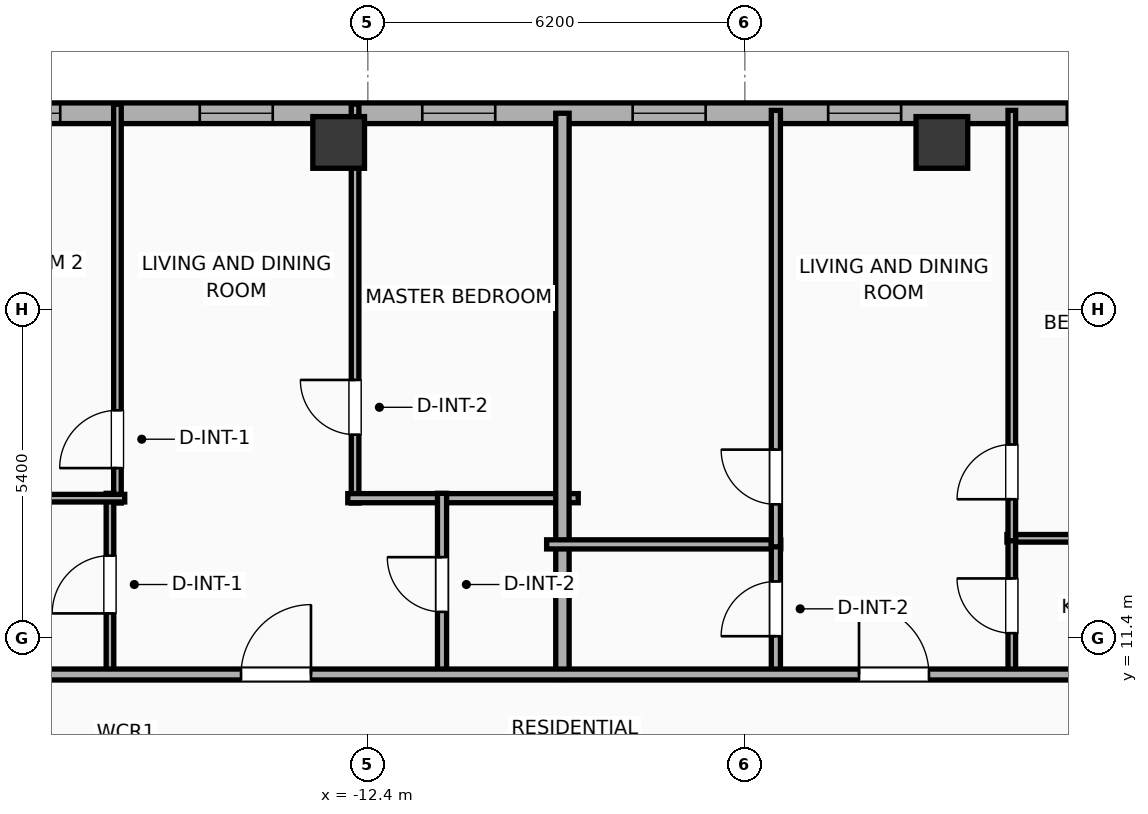
"""IFC4 building model, lengths in metres.
Left out: names, types, materials, properties, quantities, classifications, styles, units other than length and angle.
Written with IfcOpenShell. Run it as: python <this file> out.ifc"""

import sys

from ifc_helpers import new_model, si_unit, direction, frame, frame_2d, origin, origin_2d, place, context, subcontext, project, spatial, rectangle, hollow_rectangle, extrude, element, fill, save


model = new_model("IFC4")
c1 = context("Model", 3, precision=1e-05, world=origin(), true_north=direction((0.0, 1.0)))
c2 = subcontext(c1, "Body", "Model", "MODEL_VIEW")
j1 = project(units=[si_unit("LENGTHUNIT", "METRE"), si_unit("PLANEANGLEUNIT", "RADIAN")], contexts=[c1])
p1 = place(None, origin())
s1 = spatial("IfcSite", under=j1, at=p1, CompositionType="ELEMENT")
p2 = place(p1, origin())
s2 = spatial("IfcBuilding", under=s1, at=p2, CompositionType="ELEMENT")
p3 = place(p2, frame((0.0, 0.0, 215.8)))
s3 = spatial("IfcBuildingStorey", under=s2, at=p3, CompositionType="ELEMENT", Elevation=215.8)
for number, where, z_axis, x_axis in (
    (1, (-2.96, 19.55, 0.0), (0.0, 0.0, 1.0), (1.0, 0.0, 0.0)),
    (2, (-12.88, 19.55, 0.0), (0.0, 0.0, 1.0), (1.0, 0.0, 0.0)),
):
    element("IfcColumn", number, at=place(p3, frame(where, z_axis=z_axis, x_axis=x_axis)), inside=s3, PredefinedType="COLUMN", context=c2, shape_type="SweptSolid", body=[
        extrude(hollow_rectangle(XDim=0.85, YDim=0.85, WallThickness=0.028, at=origin_2d()), origin(), (0.0, 0.0, 1.0), 3.9),
    ])
p4 = place(p3, frame((-22.783, 20.03, 0.0), z_axis=(0.0, 0.0, 1.0), x_axis=(1.0, 0.0, 0.0)))
e3 = element("IfcWall", 3, at=p4, inside=s3, PredefinedType="ELEMENTEDWALL", context=c2, shape_type="SweptSolid", body=[
    extrude(rectangle(XDim=49.566, YDim=0.34, at=frame_2d((24.783, 0.0))), origin(), (0.0, 0.0, 1.0), 3.65),
])
p5 = place(p4, frame((40.956, 0.0, 0.75)))
e4 = element("IfcOpeningElement", 4, at=p5, cuts=e3, PredefinedType="OPENING", context=c2, shape_type="SweptSolid", body=[
    extrude(rectangle(XDim=2.4, YDim=2.1, at=frame_2d((1.2, 1.05))), frame((0.0, 0.18, 0.0), z_axis=(0.0, -1.0, 0.0), x_axis=(1.0, 0.0, 0.0)), (0.0, 0.0, 1.0), 0.36),
])
p6 = place(p4, frame((1.437, 0.0, 0.75)))
e5 = element("IfcOpeningElement", 5, at=p6, cuts=e3, PredefinedType="OPENING", context=c2, shape_type="SweptSolid", body=[
    extrude(rectangle(XDim=1.2, YDim=2.05, at=frame_2d((0.6, 1.025))), frame((0.0, 0.18, 0.0), z_axis=(0.0, -1.0, 0.0), x_axis=(1.0, 0.0, 0.0)), (0.0, 0.0, 1.0), 0.36),
])
p7 = place(p4, frame((7.619, 0.0, 0.75)))
e6 = element("IfcOpeningElement", 6, at=p7, cuts=e3, PredefinedType="OPENING", context=c2, shape_type="SweptSolid", body=[
    extrude(rectangle(XDim=1.2, YDim=2.05, at=frame_2d((0.6, 1.025))), frame((0.0, 0.18, 0.0), z_axis=(0.0, -1.0, 0.0), x_axis=(1.0, 0.0, 0.0)), (0.0, 0.0, 1.0), 0.36),
])
p8 = place(p4, frame((4.124, 0.0, 0.75)))
e7 = element("IfcOpeningElement", 7, at=p8, cuts=e3, PredefinedType="OPENING", context=c2, shape_type="SweptSolid", body=[
    extrude(rectangle(XDim=1.2, YDim=2.05, at=frame_2d((0.6, 1.025))), frame((0.0, 0.18, 0.0), z_axis=(0.0, -1.0, 0.0), x_axis=(1.0, 0.0, 0.0)), (0.0, 0.0, 1.0), 0.36),
])
p9 = place(p4, frame((11.278, 0.0, 0.75)))
e8 = element("IfcOpeningElement", 8, at=p9, cuts=e3, PredefinedType="OPENING", context=c2, shape_type="SweptSolid", body=[
    extrude(rectangle(XDim=1.2, YDim=2.05, at=frame_2d((0.6, 1.025))), frame((0.0, 0.18, 0.0), z_axis=(0.0, -1.0, 0.0), x_axis=(1.0, 0.0, 0.0)), (0.0, 0.0, 1.0), 0.36),
])
p10 = place(p4, frame((17.953, 0.0, 0.75)))
e9 = element("IfcOpeningElement", 9, at=p10, cuts=e3, PredefinedType="OPENING", context=c2, shape_type="SweptSolid", body=[
    extrude(rectangle(XDim=1.2, YDim=2.05, at=frame_2d((0.6, 1.025))), frame((0.0, 0.18, 0.0), z_axis=(0.0, -1.0, 0.0), x_axis=(1.0, 0.0, 0.0)), (0.0, 0.0, 1.0), 0.36),
])
p11 = place(p4, frame((14.738, 0.0, 0.75)))
e10 = element("IfcOpeningElement", 10, at=p11, cuts=e3, PredefinedType="OPENING", context=c2, shape_type="SweptSolid", body=[
    extrude(rectangle(XDim=1.2, YDim=2.05, at=frame_2d((0.6, 1.025))), frame((0.0, 0.18, 0.0), z_axis=(0.0, -1.0, 0.0), x_axis=(1.0, 0.0, 0.0)), (0.0, 0.0, 1.0), 0.36),
])
p12 = place(p4, frame((21.878, 0.0, 0.75)))
e11 = element("IfcOpeningElement", 11, at=p12, cuts=e3, PredefinedType="OPENING", context=c2, shape_type="SweptSolid", body=[
    extrude(rectangle(XDim=1.2, YDim=2.05, at=frame_2d((0.6, 1.025))), frame((0.0, 0.18, 0.0), z_axis=(0.0, -1.0, 0.0), x_axis=(1.0, 0.0, 0.0)), (0.0, 0.0, 1.0), 0.36),
])
p13 = place(p4, frame((27.878, 0.0, 0.75)))
e12 = element("IfcOpeningElement", 12, at=p13, cuts=e3, PredefinedType="OPENING", context=c2, shape_type="SweptSolid", body=[
    extrude(rectangle(XDim=1.2, YDim=2.05, at=frame_2d((0.6, 1.025))), frame((0.0, 0.18, 0.0), z_axis=(0.0, -1.0, 0.0), x_axis=(1.0, 0.0, 0.0)), (0.0, 0.0, 1.0), 0.36),
])
p14 = place(p4, frame((24.863, 0.0, 0.75)))
e13 = element("IfcOpeningElement", 13, at=p14, cuts=e3, PredefinedType="OPENING", context=c2, shape_type="SweptSolid", body=[
    extrude(rectangle(XDim=1.2, YDim=2.05, at=frame_2d((0.6, 1.025))), frame((0.0, 0.18, 0.0), z_axis=(0.0, -1.0, 0.0), x_axis=(1.0, 0.0, 0.0)), (0.0, 0.0, 1.0), 0.36),
])
p15 = place(p4, frame((32.078, 0.0, 0.75)))
e14 = element("IfcOpeningElement", 14, at=p15, cuts=e3, PredefinedType="OPENING", context=c2, shape_type="SweptSolid", body=[
    extrude(rectangle(XDim=1.2, YDim=2.05, at=frame_2d((0.6, 1.025))), frame((0.0, 0.18, 0.0), z_axis=(0.0, -1.0, 0.0), x_axis=(1.0, 0.0, 0.0)), (0.0, 0.0, 1.0), 0.36),
])
p16 = place(p4, frame((35.216, 0.0, 0.75)))
e15 = element("IfcOpeningElement", 15, at=p16, cuts=e3, PredefinedType="OPENING", context=c2, shape_type="SweptSolid", body=[
    extrude(rectangle(XDim=1.2, YDim=2.05, at=frame_2d((0.6, 1.025))), frame((0.0, 0.18, 0.0), z_axis=(0.0, -1.0, 0.0), x_axis=(1.0, 0.0, 0.0)), (0.0, 0.0, 1.0), 0.36),
])
p17 = place(p4, frame((45.73, 0.0, 0.75)))
e16 = element("IfcOpeningElement", 16, at=p17, cuts=e3, PredefinedType="OPENING", context=c2, shape_type="SweptSolid", body=[
    extrude(rectangle(XDim=1.2, YDim=2.05, at=frame_2d((0.6, 1.025))), frame((0.0, 0.18, 0.0), z_axis=(0.0, -1.0, 0.0), x_axis=(1.0, 0.0, 0.0)), (0.0, 0.0, 1.0), 0.36),
])
p18 = place(p3, frame((-16.518, 13.62, 0.0), z_axis=(0.0, 0.0, 1.0), x_axis=(0.0, 1.0, 0.0)))
e17 = element("IfcWall", 17, at=p18, inside=s3, PredefinedType="PARTITIONING", context=c2, shape_type="SweptSolid", body=[
    extrude(rectangle(XDim=6.56, YDim=0.125, at=frame_2d((3.28, 0.0))), origin(), (0.0, 0.0, 1.0), 3.65),
])
p19 = place(p18, frame((0.575, 0.0, 0.0)))
e18 = element("IfcOpeningElement", 18, at=p19, cuts=e17, PredefinedType="OPENING", context=c2, shape_type="SweptSolid", body=[
    extrude(rectangle(XDim=0.95, YDim=2.05, at=frame_2d((0.475, 1.025))), frame((0.0, 0.073, 0.0), z_axis=(0.0, -1.0, 0.0), x_axis=(1.0, 0.0, 0.0)), (0.0, 0.0, 1.0), 0.145),
])
p20 = place(p3, frame((-12.61, 13.62, 0.0), z_axis=(0.0, 0.0, 1.0), x_axis=(0.0, 1.0, 0.0)))
e19 = element("IfcWall", 19, at=p20, inside=s3, PredefinedType="PARTITIONING", context=c2, shape_type="SweptSolid", body=[
    extrude(rectangle(XDim=6.56, YDim=0.125, at=frame_2d((3.28, 0.0))), origin(), (0.0, 0.0, 1.0), 3.09),
])
p21 = place(p20, frame((1.125, 0.0, 0.0)))
e20 = element("IfcOpeningElement", 20, at=p21, cuts=e19, PredefinedType="OPENING", context=c2, shape_type="SweptSolid", body=[
    extrude(rectangle(XDim=0.9, YDim=2.05, at=frame_2d((0.45, 1.025))), frame((0.0, 0.073, 0.0), z_axis=(0.0, -1.0, 0.0), x_axis=(1.0, 0.0, 0.0)), (0.0, 0.0, 1.0), 0.145),
])
p22 = place(p3, frame((-12.73, 13.7, 0.0), z_axis=(0.0, 0.0, 1.0), x_axis=(1.0, 0.0, 0.0)))
e21 = element("IfcWall", 21, at=p22, inside=s3, PredefinedType="PLUMBINGWALL", context=c2, shape_type="SweptSolid", body=[
    extrude(rectangle(XDim=3.79, YDim=0.15, at=frame_2d((1.895, 0.0))), origin(), (0.0, 0.0, 1.0), 3.65),
])
p23 = place(p3, frame((-16.641, 10.78, 0.0), z_axis=(0.0, 0.0, 1.0), x_axis=(0.0, 1.0, 0.0)))
e22 = element("IfcWall", 22, at=p23, inside=s3, PredefinedType="PARTITIONING", context=c2, shape_type="SweptSolid", body=[
    extrude(rectangle(XDim=3.0, YDim=0.125, at=frame_2d((1.5, 0.0))), origin(), (0.0, 0.0, 1.0), 3.65),
])
p24 = place(p23, frame((1.025, 0.0, 0.0)))
e23 = element("IfcOpeningElement", 23, at=p24, cuts=e22, PredefinedType="OPENING", context=c2, shape_type="SweptSolid", body=[
    extrude(rectangle(XDim=0.95, YDim=2.05, at=frame_2d((0.475, 1.025))), frame((0.0, 0.073, 0.0), z_axis=(0.0, -1.0, 0.0), x_axis=(1.0, 0.0, 0.0)), (0.0, 0.0, 1.0), 0.145),
])
p25 = place(p3, frame((-19.86, 13.7, 0.0), z_axis=(0.0, 0.0, 1.0), x_axis=(1.0, 0.0, 0.0)))
e24 = element("IfcWall", 24, at=p25, inside=s3, PredefinedType="PARTITIONING", context=c2, shape_type="SweptSolid", body=[
    extrude(rectangle(XDim=3.462, YDim=0.125, at=frame_2d((1.731, 0.0))), origin(), (0.0, 0.0, 1.0), 3.65),
])
p26 = place(p3, frame((-11.18, 10.78, 0.0), z_axis=(0.0, 0.0, 1.0), x_axis=(0.0, 1.0, 0.0)))
e25 = element("IfcWall", 25, at=p26, inside=s3, PredefinedType="PLUMBINGWALL", context=c2, shape_type="SweptSolid", body=[
    extrude(rectangle(XDim=3.0, YDim=0.15, at=frame_2d((1.5, 0.0))), origin(), (0.0, 0.0, 1.0), 3.65),
])
p27 = place(p26, frame((1.05, 0.0, 0.0)))
e26 = element("IfcOpeningElement", 26, at=p27, cuts=e25, PredefinedType="OPENING", context=c2, shape_type="SweptSolid", body=[
    extrude(rectangle(XDim=0.9, YDim=2.05, at=frame_2d((0.45, 1.025))), frame((0.0, 0.085, 0.0), z_axis=(0.0, -1.0, 0.0), x_axis=(1.0, 0.0, 0.0)), (0.0, 0.0, 1.0), 0.17),
])
p28 = place(p3, frame((-9.2, 10.72, 0.0), z_axis=(0.0, 0.0, 1.0), x_axis=(0.0, 1.0, 0.0)))
e27 = element("IfcWall", 27, at=p28, inside=s3, PredefinedType="PARTITIONING", context=c2, shape_type="SweptSolid", body=[
    extrude(rectangle(XDim=9.31, YDim=0.22, at=frame_2d((4.655, 0.0))), origin(), (0.0, 0.0, 1.0), 3.65),
])
p29 = place(p3, frame((-9.46, 12.94, 0.0), z_axis=(0.0, 0.0, 1.0), x_axis=(1.0, 0.0, 0.0)))
e28 = element("IfcWall", 28, at=p29, inside=s3, PredefinedType="PLUMBINGWALL", context=c2, shape_type="SweptSolid", body=[
    extrude(rectangle(XDim=3.85, YDim=0.15, at=frame_2d((1.925, 0.0))), origin(), (0.0, 0.0, 1.0), 3.65),
])
p30 = place(p3, frame((-1.89, 13.04, 0.0), z_axis=(0.0, 0.0, 1.0), x_axis=(1.0, 0.0, 0.0)))
e29 = element("IfcWall", 29, at=p30, inside=s3, PredefinedType="PARTITIONING", context=c2, shape_type="SweptSolid", body=[
    extrude(rectangle(XDim=3.35, YDim=0.125, at=frame_2d((1.675, 0.0))), origin(), (0.0, 0.0, 1.0), 3.65),
])
p31 = place(p3, frame((-5.69, 10.78, 0.0), z_axis=(0.0, 0.0, 1.0), x_axis=(0.0, 1.0, 0.0)))
e30 = element("IfcWall", 30, at=p31, inside=s3, PredefinedType="PLUMBINGWALL", context=c2, shape_type="SweptSolid", body=[
    extrude(rectangle(XDim=2.2, YDim=0.15, at=frame_2d((1.1, 0.0))), origin(), (0.0, 0.0, 1.0), 3.65),
])
p32 = place(p31, frame((0.65, 0.0, 0.0)))
e31 = element("IfcOpeningElement", 31, at=p32, cuts=e30, PredefinedType="OPENING", context=c2, shape_type="SweptSolid", body=[
    extrude(rectangle(XDim=0.9, YDim=2.05, at=frame_2d((0.45, 1.025))), frame((0.0, 0.085, 0.0), z_axis=(0.0, -1.0, 0.0), x_axis=(1.0, 0.0, 0.0)), (0.0, 0.0, 1.0), 0.17),
])
p33 = place(p3, frame((-5.69, 12.9, 0.0), z_axis=(0.0, 0.0, 1.0), x_axis=(0.0, 1.0, 0.0)))
e32 = element("IfcWall", 32, at=p33, inside=s3, PredefinedType="PLUMBINGWALL", context=c2, shape_type="SweptSolid", body=[
    extrude(rectangle(XDim=7.177, YDim=0.15, at=frame_2d((3.588, 0.0))), origin(), (0.0, 0.0, 1.0), 3.65),
])
p34 = place(p33, frame((0.698, 0.0, 0.0)))
e33 = element("IfcOpeningElement", 33, at=p34, cuts=e32, PredefinedType="OPENING", context=c2, shape_type="SweptSolid", body=[
    extrude(rectangle(XDim=0.9, YDim=2.05, at=frame_2d((0.45, 1.025))), frame((0.0, 0.085, 0.0), z_axis=(0.0, -1.0, 0.0), x_axis=(1.0, 0.0, 0.0)), (0.0, 0.0, 1.0), 0.17),
])
p35 = place(p3, frame((-1.81, 10.78, 0.0), z_axis=(0.0, 0.0, 1.0), x_axis=(0.0, 1.0, 0.0)))
e34 = element("IfcWall", 34, at=p35, inside=s3, PredefinedType="PARTITIONING", context=c2, shape_type="SweptSolid", body=[
    extrude(rectangle(XDim=2.3, YDim=0.125, at=frame_2d((1.15, 0.0))), origin(), (0.0, 0.0, 1.0), 3.65),
])
p36 = place(p35, frame((0.7, 0.0, 0.0)))
e35 = element("IfcOpeningElement", 35, at=p36, cuts=e34, PredefinedType="OPENING", context=c2, shape_type="SweptSolid", body=[
    extrude(rectangle(XDim=0.9, YDim=2.05, at=frame_2d((0.45, 1.025))), frame((0.0, 0.073, 0.0), z_axis=(0.0, -1.0, 0.0), x_axis=(1.0, 0.0, 0.0)), (0.0, 0.0, 1.0), 0.145),
])
p37 = place(p3, frame((-1.81, 13.0, 0.0), z_axis=(0.0, 0.0, 1.0), x_axis=(0.0, 1.0, 0.0)))
e36 = element("IfcWall", 36, at=p37, inside=s3, PredefinedType="PARTITIONING", context=c2, shape_type="SweptSolid", body=[
    extrude(rectangle(XDim=7.077, YDim=0.125, at=frame_2d((3.539, 0.0))), origin(), (0.0, 0.0, 1.0), 3.65),
])
p38 = place(p37, frame((0.682, 0.0, 0.0)))
e37 = element("IfcOpeningElement", 37, at=p38, cuts=e36, PredefinedType="OPENING", context=c2, shape_type="SweptSolid", body=[
    extrude(rectangle(XDim=0.9, YDim=2.05, at=frame_2d((0.45, 1.025))), frame((0.0, 0.073, 0.0), z_axis=(0.0, -1.0, 0.0), x_axis=(1.0, 0.0, 0.0)), (0.0, 0.0, 1.0), 0.145),
])
p39 = place(p3, frame((-26.23, 10.8, 0.0), z_axis=(0.0, 0.0, 1.0), x_axis=(1.0, 0.0, 0.0)))
e38 = element("IfcWall", 38, at=p39, inside=s3, PredefinedType="PARTITIONING", context=c2, shape_type="SweptSolid", body=[
    extrude(rectangle(XDim=56.46, YDim=0.18, at=frame_2d((28.23, 0.0))), origin(), (0.0, 0.0, 1.0), 3.65),
])
p40 = place(p39, frame((2.994, 0.0, 0.0)))
e39 = element("IfcOpeningElement", 39, at=p40, cuts=e38, PredefinedType="OPENING", context=c2, shape_type="SweptSolid", body=[
    extrude(rectangle(XDim=0.9, YDim=2.05, at=frame_2d((0.45, 1.025))), frame((0.0, 0.1, 0.0), z_axis=(0.0, -1.0, 0.0), x_axis=(1.0, 0.0, 0.0)), (0.0, 0.0, 1.0), 0.2),
])
p41 = place(p39, frame((11.745, 0.0, 0.0)))
e40 = element("IfcOpeningElement", 40, at=p41, cuts=e38, PredefinedType="OPENING", context=c2, shape_type="SweptSolid", body=[
    extrude(rectangle(XDim=1.15, YDim=2.05, at=frame_2d((0.575, 1.025))), frame((0.0, 0.1, 0.0), z_axis=(0.0, -1.0, 0.0), x_axis=(1.0, 0.0, 0.0)), (0.0, 0.0, 1.0), 0.2),
])
p42 = place(p39, frame((21.907, 0.0, 0.0)))
e41 = element("IfcOpeningElement", 41, at=p42, cuts=e38, PredefinedType="OPENING", context=c2, shape_type="SweptSolid", body=[
    extrude(rectangle(XDim=1.15, YDim=2.05, at=frame_2d((0.575, 1.025))), frame((0.0, 0.1, 0.0), z_axis=(0.0, -1.0, 0.0), x_axis=(1.0, 0.0, 0.0)), (0.0, 0.0, 1.0), 0.2),
])
p43 = place(p39, frame((32.516, 0.0, 0.0)))
e42 = element("IfcOpeningElement", 42, at=p43, cuts=e38, PredefinedType="OPENING", context=c2, shape_type="SweptSolid", body=[
    extrude(rectangle(XDim=1.15, YDim=2.05, at=frame_2d((0.575, 1.025))), frame((0.0, 0.1, 0.0), z_axis=(0.0, -1.0, 0.0), x_axis=(1.0, 0.0, 0.0)), (0.0, 0.0, 1.0), 0.2),
])
p44 = place(p39, frame((41.956, 0.0, 0.0)))
e43 = element("IfcOpeningElement", 43, at=p44, cuts=e38, PredefinedType="OPENING", context=c2, shape_type="SweptSolid", body=[
    extrude(rectangle(XDim=1.15, YDim=2.05, at=frame_2d((0.575, 1.025))), frame((0.0, 0.1, 0.0), z_axis=(0.0, -1.0, 0.0), x_axis=(1.0, 0.0, 0.0)), (0.0, 0.0, 1.0), 0.2),
])
p45 = place(p39, frame((51.656, 0.0, 0.0)))
e44 = element("IfcOpeningElement", 44, at=p45, cuts=e38, PredefinedType="OPENING", context=c2, shape_type="SweptSolid", body=[
    extrude(rectangle(XDim=1.15, YDim=2.05, at=frame_2d((0.575, 1.025))), frame((0.0, 0.1, 0.0), z_axis=(0.0, -1.0, 0.0), x_axis=(1.0, 0.0, 0.0)), (0.0, 0.0, 1.0), 0.2),
])
p46 = place(p7, origin())
e45 = element("IfcWindow", 45, at=p46, inside=s3, PartitioningType="SINGLE_PANEL", PredefinedType="WINDOW", context=c2, shape_type="SweptSolid", body=[
    extrude(rectangle(XDim=1.2, YDim=2.05, at=frame_2d((0.6, 1.025))), frame((0.0, 0.03, 0.0), z_axis=(0.0, -1.0, 0.0), x_axis=(1.0, 0.0, 0.0)), (0.0, 0.0, 1.0), 0.06),
])
fill(e6, e45)
p47 = place(p8, origin())
e46 = element("IfcWindow", 46, at=p47, inside=s3, PartitioningType="SINGLE_PANEL", PredefinedType="WINDOW", context=c2, shape_type="SweptSolid", body=[
    extrude(rectangle(XDim=1.2, YDim=2.05, at=frame_2d((0.6, 1.025))), frame((0.0, 0.03, 0.0), z_axis=(0.0, -1.0, 0.0), x_axis=(1.0, 0.0, 0.0)), (0.0, 0.0, 1.0), 0.06),
])
fill(e7, e46)
p48 = place(p9, origin())
e47 = element("IfcWindow", 47, at=p48, inside=s3, PartitioningType="SINGLE_PANEL", PredefinedType="WINDOW", context=c2, shape_type="SweptSolid", body=[
    extrude(rectangle(XDim=1.2, YDim=2.05, at=frame_2d((0.6, 1.025))), frame((0.0, 0.03, 0.0), z_axis=(0.0, -1.0, 0.0), x_axis=(1.0, 0.0, 0.0)), (0.0, 0.0, 1.0), 0.06),
])
fill(e8, e47)
p49 = place(p10, origin())
e48 = element("IfcWindow", 48, at=p49, inside=s3, PartitioningType="SINGLE_PANEL", PredefinedType="WINDOW", context=c2, shape_type="SweptSolid", body=[
    extrude(rectangle(XDim=1.2, YDim=2.05, at=frame_2d((0.6, 1.025))), frame((0.0, 0.03, 0.0), z_axis=(0.0, -1.0, 0.0), x_axis=(1.0, 0.0, 0.0)), (0.0, 0.0, 1.0), 0.06),
])
fill(e9, e48)
p50 = place(p11, origin())
e49 = element("IfcWindow", 49, at=p50, inside=s3, PartitioningType="SINGLE_PANEL", PredefinedType="WINDOW", context=c2, shape_type="SweptSolid", body=[
    extrude(rectangle(XDim=1.2, YDim=2.05, at=frame_2d((0.6, 1.025))), frame((0.0, 0.03, 0.0), z_axis=(0.0, -1.0, 0.0), x_axis=(1.0, 0.0, 0.0)), (0.0, 0.0, 1.0), 0.06),
])
fill(e10, e49)
p51 = place(p12, origin())
e50 = element("IfcWindow", 50, at=p51, inside=s3, PartitioningType="SINGLE_PANEL", PredefinedType="WINDOW", context=c2, shape_type="SweptSolid", body=[
    extrude(rectangle(XDim=1.2, YDim=2.05, at=frame_2d((0.6, 1.025))), frame((0.0, 0.03, 0.0), z_axis=(0.0, -1.0, 0.0), x_axis=(1.0, 0.0, 0.0)), (0.0, 0.0, 1.0), 0.06),
])
fill(e11, e50)
p52 = place(p19, origin())
e51 = element("IfcDoor", 51, at=p52, inside=s3, OperationType="SINGLE_SWING_LEFT", PredefinedType="DOOR", context=c2, shape_type="SweptSolid", body=[
    extrude(rectangle(XDim=0.95, YDim=2.05, at=frame_2d((0.475, 1.025))), frame((0.0, 0.025, 0.0), z_axis=(0.0, -1.0, 0.0), x_axis=(1.0, 0.0, 0.0)), (0.0, 0.0, 1.0), 0.05),
])
fill(e18, e51)
p53 = place(p21, origin())
e52 = element("IfcDoor", 52, at=p53, inside=s3, OperationType="SINGLE_SWING_RIGHT", PredefinedType="DOOR", context=c2, shape_type="SweptSolid", body=[
    extrude(rectangle(XDim=0.9, YDim=2.05, at=frame_2d((0.45, 1.025))), frame((0.0, 0.025, 0.0), z_axis=(0.0, -1.0, 0.0), x_axis=(1.0, 0.0, 0.0)), (0.0, 0.0, 1.0), 0.05),
])
fill(e20, e52)
p54 = place(p24, origin())
e53 = element("IfcDoor", 53, at=p54, inside=s3, OperationType="SINGLE_SWING_LEFT", PredefinedType="DOOR", context=c2, shape_type="SweptSolid", body=[
    extrude(rectangle(XDim=0.95, YDim=2.05, at=frame_2d((0.475, 1.025))), frame((0.0, 0.025, 0.0), z_axis=(0.0, -1.0, 0.0), x_axis=(1.0, 0.0, 0.0)), (0.0, 0.0, 1.0), 0.05),
])
fill(e23, e53)
p55 = place(p27, origin())
e54 = element("IfcDoor", 54, at=p55, inside=s3, OperationType="SINGLE_SWING_RIGHT", PredefinedType="DOOR", context=c2, shape_type="SweptSolid", body=[
    extrude(rectangle(XDim=0.9, YDim=2.05, at=frame_2d((0.45, 1.025))), frame((0.0, 0.025, 0.0), z_axis=(0.0, -1.0, 0.0), x_axis=(1.0, 0.0, 0.0)), (0.0, 0.0, 1.0), 0.05),
])
fill(e26, e54)
p56 = place(p32, origin())
e55 = element("IfcDoor", 55, at=p56, inside=s3, OperationType="SINGLE_SWING_LEFT", PredefinedType="DOOR", context=c2, shape_type="SweptSolid", body=[
    extrude(rectangle(XDim=0.9, YDim=2.05, at=frame_2d((0.45, 1.025))), frame((0.0, 0.025, 0.0), z_axis=(0.0, -1.0, 0.0), x_axis=(1.0, 0.0, 0.0)), (0.0, 0.0, 1.0), 0.05),
])
fill(e31, e55)
p57 = place(p34, origin())
e56 = element("IfcDoor", 56, at=p57, inside=s3, OperationType="SINGLE_SWING_RIGHT", PredefinedType="DOOR", context=c2, shape_type="SweptSolid", body=[
    extrude(rectangle(XDim=0.9, YDim=2.05, at=frame_2d((0.45, 1.025))), frame((0.0, 0.025, 0.0), z_axis=(0.0, -1.0, 0.0), x_axis=(1.0, 0.0, 0.0)), (0.0, 0.0, 1.0), 0.05),
])
fill(e33, e56)
p58 = place(p36, origin())
e57 = element("IfcDoor", 57, at=p58, inside=s3, OperationType="SINGLE_SWING_RIGHT", PredefinedType="DOOR", context=c2, shape_type="SweptSolid", body=[
    extrude(rectangle(XDim=0.9, YDim=2.05, at=frame_2d((0.45, 1.025))), frame((0.0, 0.025, 0.0), z_axis=(0.0, -1.0, 0.0), x_axis=(1.0, 0.0, 0.0)), (0.0, 0.0, 1.0), 0.05),
])
fill(e35, e57)
p59 = place(p38, origin())
e58 = element("IfcDoor", 58, at=p59, inside=s3, OperationType="SINGLE_SWING_LEFT", PredefinedType="DOOR", context=c2, shape_type="SweptSolid", body=[
    extrude(rectangle(XDim=0.9, YDim=2.05, at=frame_2d((0.45, 1.025))), frame((0.0, 0.025, 0.0), z_axis=(0.0, -1.0, 0.0), x_axis=(1.0, 0.0, 0.0)), (0.0, 0.0, 1.0), 0.05),
])
fill(e37, e58)
p60 = place(p41, origin())
e59 = element("IfcDoor", 59, at=p60, inside=s3, OperationType="SINGLE_SWING_RIGHT", PredefinedType="DOOR", context=c2, shape_type="SweptSolid", body=[
    extrude(rectangle(XDim=1.15, YDim=2.05, at=frame_2d((0.575, 1.025))), frame((0.0, 0.025, 0.0), z_axis=(0.0, -1.0, 0.0), x_axis=(1.0, 0.0, 0.0)), (0.0, 0.0, 1.0), 0.05),
])
fill(e40, e59)
p61 = place(p42, origin())
e60 = element("IfcDoor", 60, at=p61, inside=s3, OperationType="SINGLE_SWING_LEFT", PredefinedType="DOOR", context=c2, shape_type="SweptSolid", body=[
    extrude(rectangle(XDim=1.15, YDim=2.05, at=frame_2d((0.575, 1.025))), frame((0.0, 0.025, 0.0), z_axis=(0.0, -1.0, 0.0), x_axis=(1.0, 0.0, 0.0)), (0.0, 0.0, 1.0), 0.05),
])
fill(e41, e60)
save(model, sys.argv[1])
